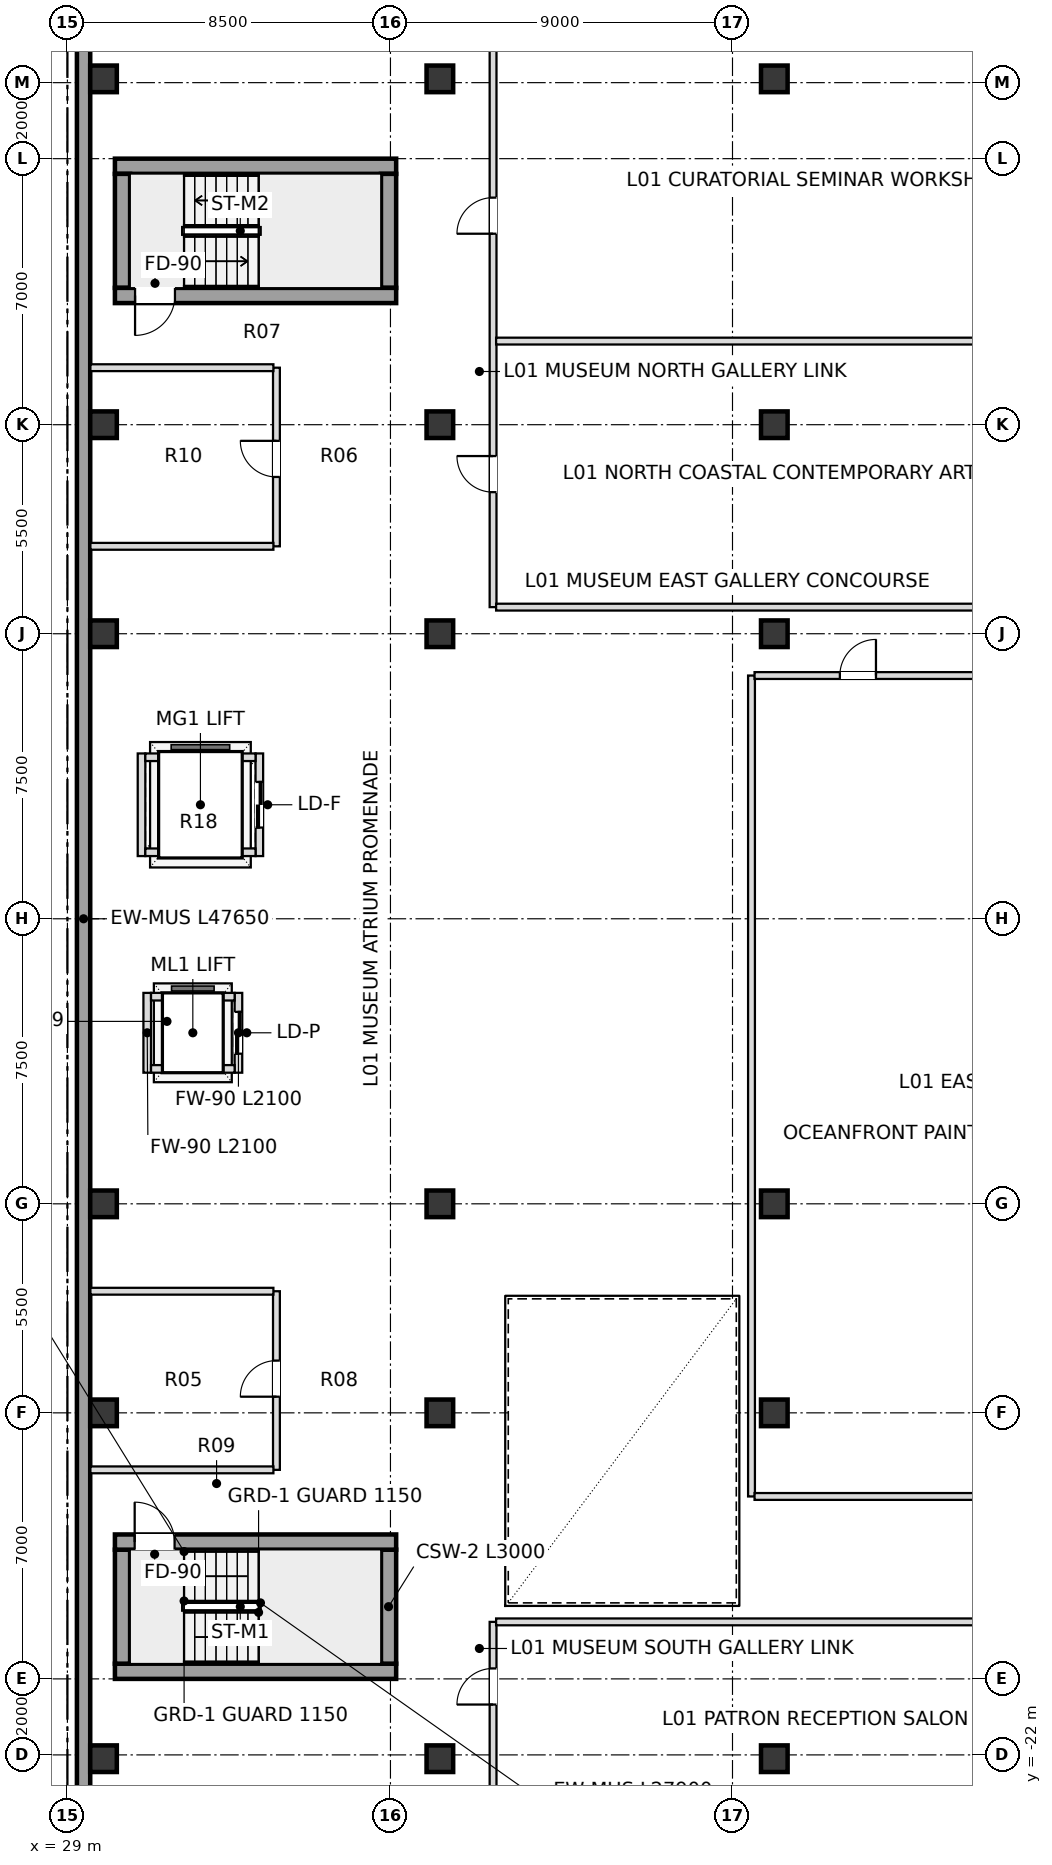
"""IFC4 building model, lengths in metres.
Left out: names, types, materials, properties, quantities, classifications, styles, units other than length and angle.
Written with IfcOpenShell. Run it as: python <this file> out.ifc"""

import sys

from ifc_helpers import new_model, si_unit, direction, frame, frame_2d, origin, origin_2d, place, context, subcontext, project, spatial, rectangle, extrude, element, fill, save


model = new_model("IFC4")
c1 = context("Model", 3, precision=1e-05, world=origin(), true_north=direction((0.0, 1.0)))
c2 = subcontext(c1, "Body", "Model", "MODEL_VIEW")
j1 = project(units=[si_unit("LENGTHUNIT", "METRE"), si_unit("PLANEANGLEUNIT", "RADIAN")], contexts=[c1])
p1 = place(None, origin())
s1 = spatial("IfcSite", under=j1, at=p1, CompositionType="ELEMENT")
p2 = place(p1, origin())
s2 = spatial("IfcBuilding", under=s1, at=p2, CompositionType="ELEMENT")
p3 = place(p2, frame((0.0, 0.0, 6.0)))
s3 = spatial("IfcBuildingStorey", under=s2, at=p3, CompositionType="ELEMENT", Elevation=6.0)
for number, where, z_axis, x_axis in (
    (1, (29.95, -22.1, 0.0), (0.0, 0.0, 1.0), (1.0, 0.0, 0.0)),
    (2, (29.95, -13.0, 0.0), (0.0, 0.0, 1.0), (1.0, 0.0, 0.0)),
    (3, (29.95, -7.5, 0.0), (0.0, 0.0, 1.0), (1.0, 0.0, 0.0)),
    (4, (29.95, 7.5, 0.0), (0.0, 0.0, 1.0), (1.0, 0.0, 0.0)),
    (5, (29.95, 13.0, 0.0), (0.0, 0.0, 1.0), (1.0, 0.0, 0.0)),
    (6, (29.95, 22.1, 0.0), (0.0, 0.0, 1.0), (1.0, 0.0, 0.0)),
    (7, (38.8, -22.1, 0.0), (0.0, 0.0, 1.0), (1.0, 0.0, 0.0)),
    (8, (38.8, -13.0, 0.0), (0.0, 0.0, 1.0), (1.0, 0.0, 0.0)),
    (9, (38.8, -7.5, 0.0), (0.0, 0.0, 1.0), (1.0, 0.0, 0.0)),
    (10, (38.8, 7.5, 0.0), (0.0, 0.0, 1.0), (1.0, 0.0, 0.0)),
    (11, (38.8, 13.0, 0.0), (0.0, 0.0, 1.0), (1.0, 0.0, 0.0)),
    (12, (38.8, 22.1, 0.0), (0.0, 0.0, 1.0), (1.0, 0.0, 0.0)),
    (13, (47.6, -22.1, 0.0), (0.0, 0.0, 1.0), (1.0, 0.0, 0.0)),
    (14, (47.6, -13.0, 0.0), (0.0, 0.0, 1.0), (1.0, 0.0, 0.0)),
    (15, (47.6, -7.5, 0.0), (0.0, 0.0, 1.0), (1.0, 0.0, 0.0)),
    (16, (47.6, 7.5, 0.0), (0.0, 0.0, 1.0), (1.0, 0.0, 0.0)),
    (17, (47.6, 13.0, 0.0), (0.0, 0.0, 1.0), (1.0, 0.0, 0.0)),
    (18, (47.6, 22.1, 0.0), (0.0, 0.0, 1.0), (1.0, 0.0, 0.0)),
):
    element("IfcColumn", number, at=place(p3, frame(where, z_axis=z_axis, x_axis=x_axis)), inside=s3, PredefinedType="COLUMN", context=c2, shape_type="SweptSolid", body=[
        extrude(rectangle(XDim=0.7, YDim=0.7, at=origin_2d()), origin(), (0.0, 0.0, 1.0), 5.4),
    ])
p4 = place(p3, frame((29.425, 23.825, 0.0), z_axis=(0.0, 0.0, 1.0), x_axis=(0.0, -1.0, 0.0)))
e19 = element("IfcWall", 19, at=p4, inside=s3, PredefinedType="SOLIDWALL", context=c2, shape_type="SweptSolid", body=[
    extrude(rectangle(XDim=47.65, YDim=0.35, at=frame_2d((23.825, 0.0))), origin(), (0.0, 0.0, 1.0), 5.08),
])
p5 = place(p3, frame((37.65, -19.8, 0.0), z_axis=(0.0, 0.0, 1.0), x_axis=(-1.0, 0.0, 0.0)))
e20 = element("IfcWall", 20, at=p5, inside=s3, PredefinedType="SHEAR", context=c2, shape_type="SweptSolid", body=[
    extrude(rectangle(XDim=7.4, YDim=0.4, at=frame_2d((3.7, 0.0))), origin(), (0.0, 0.0, 1.0), 5.08),
])
for number, where, z_axis, x_axis in (
    (21, (37.45, -19.6, 0.0), (0.0, 0.0, 1.0), (0.0, 1.0, 0.0)),
    (22, (30.45, -19.6, 0.0), (0.0, 0.0, 1.0), (0.0, 1.0, 0.0)),
):
    element("IfcWall", number, at=place(p3, frame(where, z_axis=z_axis, x_axis=x_axis)), inside=s3, PredefinedType="SHEAR", context=c2, shape_type="SweptSolid", body=[
        extrude(rectangle(XDim=3.0, YDim=0.4, at=frame_2d((1.5, 0.0))), origin(), (0.0, 0.0, 1.0), 5.08),
    ])
p6 = place(p3, frame((30.25, -16.4, 0.0), z_axis=(0.0, 0.0, 1.0), x_axis=(1.0, 0.0, 0.0)))
e23 = element("IfcWall", 23, at=p6, inside=s3, PredefinedType="SHEAR", context=c2, shape_type="SweptSolid", body=[
    extrude(rectangle(XDim=7.4, YDim=0.4, at=frame_2d((3.7, 0.0))), origin(), (0.0, 0.0, 1.0), 5.08),
])
p7 = place(p6, frame((0.52, 0.0, 0.0)))
e24 = element("IfcOpeningElement", 24, at=p7, cuts=e23, PredefinedType="OPENING", context=c2, shape_type="SweptSolid", body=[
    extrude(rectangle(XDim=1.05, YDim=2.15, at=frame_2d((0.525, 1.075))), frame((0.0, 0.21, 0.0), z_axis=(0.0, -1.0, 0.0), x_axis=(1.0, 0.0, 0.0)), (0.0, 0.0, 1.0), 0.42),
])
p8 = place(p3, frame((30.25, 19.8, 0.0), z_axis=(0.0, 0.0, 1.0), x_axis=(1.0, 0.0, 0.0)))
e25 = element("IfcWall", 25, at=p8, inside=s3, PredefinedType="SHEAR", context=c2, shape_type="SweptSolid", body=[
    extrude(rectangle(XDim=7.4, YDim=0.4, at=frame_2d((3.7, 0.0))), origin(), (0.0, 0.0, 1.0), 5.08),
])
for number, where, z_axis, x_axis in (
    (26, (37.45, 16.6, 0.0), (0.0, 0.0, 1.0), (0.0, 1.0, 0.0)),
    (27, (30.45, 16.6, 0.0), (0.0, 0.0, 1.0), (0.0, 1.0, 0.0)),
):
    element("IfcWall", number, at=place(p3, frame(where, z_axis=z_axis, x_axis=x_axis)), inside=s3, PredefinedType="SHEAR", context=c2, shape_type="SweptSolid", body=[
        extrude(rectangle(XDim=3.0, YDim=0.4, at=frame_2d((1.5, 0.0))), origin(), (0.0, 0.0, 1.0), 5.08),
    ])
p9 = place(p3, frame((37.65, 16.4, 0.0), z_axis=(0.0, 0.0, 1.0), x_axis=(-1.0, 0.0, 0.0)))
e28 = element("IfcWall", 28, at=p9, inside=s3, PredefinedType="SHEAR", context=c2, shape_type="SweptSolid", body=[
    extrude(rectangle(XDim=7.4, YDim=0.4, at=frame_2d((3.7, 0.0))), origin(), (0.0, 0.0, 1.0), 5.08),
])
p10 = place(p9, frame((5.82, 0.0, 0.0)))
e29 = element("IfcOpeningElement", 29, at=p10, cuts=e28, PredefinedType="OPENING", context=c2, shape_type="SweptSolid", body=[
    extrude(rectangle(XDim=1.05, YDim=2.15, at=frame_2d((0.525, 1.075))), frame((0.0, 0.21, 0.0), z_axis=(0.0, -1.0, 0.0), x_axis=(1.0, 0.0, 0.0)), (0.0, 0.0, 1.0), 0.42),
])
p11 = place(p3, frame((33.5, -4.05, 0.0), z_axis=(0.0, 0.0, 1.0), x_axis=(0.0, 1.0, 0.0)))
e30 = element("IfcWall", 30, at=p11, inside=s3, PredefinedType="SOLIDWALL", context=c2, shape_type="SweptSolid", body=[
    extrude(rectangle(XDim=2.1, YDim=0.2, at=frame_2d((1.05, 0.0))), origin(), (0.0, 0.0, 1.0), 4.297),
])
p12 = place(p11, frame((0.5, 0.0, 0.0)))
e31 = element("IfcOpeningElement", 31, at=p12, cuts=e30, PredefinedType="OPENING", context=c2, shape_type="SweptSolid", body=[
    extrude(rectangle(XDim=1.1, YDim=2.15, at=frame_2d((0.55, 1.075))), frame((0.0, 0.11, 0.0), z_axis=(0.0, -1.0, 0.0), x_axis=(1.0, 0.0, 0.0)), (0.0, 0.0, 1.0), 0.22),
])
p13 = place(p3, frame((31.1, -4.05, 0.0), z_axis=(0.0, 0.0, 1.0), x_axis=(0.0, 1.0, 0.0)))
e32 = element("IfcWall", 32, at=p13, inside=s3, PredefinedType="SOLIDWALL", context=c2, shape_type="SweptSolid", body=[
    extrude(rectangle(XDim=2.1, YDim=0.2, at=frame_2d((1.05, 0.0))), origin(), (0.0, 0.0, 1.0), 4.297),
])
for number, where, z_axis, x_axis in (
    (33, (31.2, -3.95, 0.0), (0.0, 0.0, 1.0), (1.0, 0.0, 0.0)),
    (34, (31.2, -2.05, 0.0), (0.0, 0.0, 1.0), (1.0, 0.0, 0.0)),
):
    element("IfcWall", number, at=place(p3, frame(where, z_axis=z_axis, x_axis=x_axis)), inside=s3, PredefinedType="SOLIDWALL", context=c2, shape_type="SweptSolid", body=[
        extrude(rectangle(XDim=2.2, YDim=0.2, at=frame_2d((1.1, 0.0))), origin(), (0.0, 0.0, 1.0), 4.297),
    ])
p14 = place(p3, frame((34.05, 1.65, 0.0), z_axis=(0.0, 0.0, 1.0), x_axis=(0.0, 1.0, 0.0)))
e35 = element("IfcWall", 35, at=p14, inside=s3, PredefinedType="SOLIDWALL", context=c2, shape_type="SweptSolid", body=[
    extrude(rectangle(XDim=2.7, YDim=0.2, at=frame_2d((1.35, 0.0))), origin(), (0.0, 0.0, 1.0), 4.297),
])
p15 = place(p14, frame((0.75, 0.0, 0.0)))
e36 = element("IfcOpeningElement", 36, at=p15, cuts=e35, PredefinedType="OPENING", context=c2, shape_type="SweptSolid", body=[
    extrude(rectangle(XDim=1.2, YDim=2.2, at=frame_2d((0.6, 1.1))), frame((0.0, 0.11, 0.0), z_axis=(0.0, -1.0, 0.0), x_axis=(1.0, 0.0, 0.0)), (0.0, 0.0, 1.0), 0.22),
])
p16 = place(p3, frame((30.95, 1.65, 0.0), z_axis=(0.0, 0.0, 1.0), x_axis=(0.0, 1.0, 0.0)))
e37 = element("IfcWall", 37, at=p16, inside=s3, PredefinedType="SOLIDWALL", context=c2, shape_type="SweptSolid", body=[
    extrude(rectangle(XDim=2.7, YDim=0.2, at=frame_2d((1.35, 0.0))), origin(), (0.0, 0.0, 1.0), 4.297),
])
for number, where, z_axis, x_axis in (
    (38, (31.05, 1.75, 0.0), (0.0, 0.0, 1.0), (1.0, 0.0, 0.0)),
    (39, (31.05, 4.25, 0.0), (0.0, 0.0, 1.0), (1.0, 0.0, 0.0)),
):
    element("IfcWall", number, at=place(p3, frame(where, z_axis=z_axis, x_axis=x_axis)), inside=s3, PredefinedType="SOLIDWALL", context=c2, shape_type="SweptSolid", body=[
        extrude(rectangle(XDim=2.9, YDim=0.2, at=frame_2d((1.45, 0.0))), origin(), (0.0, 0.0, 1.0), 4.297),
    ])
p17 = place(p3, frame((34.5, -14.5, 0.0), z_axis=(0.0, 0.0, 1.0), x_axis=(0.0, 1.0, 0.0)))
e40 = element("IfcWall", 40, at=p17, inside=s3, PredefinedType="PARTITIONING", context=c2, shape_type="SweptSolid", body=[
    extrude(rectangle(XDim=4.7, YDim=0.18, at=frame_2d((2.35, 0.0))), origin(), (0.0, 0.0, 1.0), 4.297),
])
p18 = place(p17, frame((1.925, 0.0, 0.0)))
e41 = element("IfcOpeningElement", 41, at=p18, cuts=e40, PredefinedType="OPENING", context=c2, shape_type="SweptSolid", body=[
    extrude(rectangle(XDim=0.95, YDim=2.15, at=frame_2d((0.475, 1.075))), frame((0.0, 0.1, 0.0), z_axis=(0.0, -1.0, 0.0), x_axis=(1.0, 0.0, 0.0)), (0.0, 0.0, 1.0), 0.2),
])
p19 = place(p3, frame((34.5, 9.8, 0.0), z_axis=(0.0, 0.0, 1.0), x_axis=(0.0, 1.0, 0.0)))
e42 = element("IfcWall", 42, at=p19, inside=s3, PredefinedType="PARTITIONING", context=c2, shape_type="SweptSolid", body=[
    extrude(rectangle(XDim=4.7, YDim=0.18, at=frame_2d((2.35, 0.0))), origin(), (0.0, 0.0, 1.0), 4.297),
])
p20 = place(p19, frame((1.825, 0.0, 0.0)))
e43 = element("IfcOpeningElement", 43, at=p20, cuts=e42, PredefinedType="OPENING", context=c2, shape_type="SweptSolid", body=[
    extrude(rectangle(XDim=0.95, YDim=2.15, at=frame_2d((0.475, 1.075))), frame((0.0, 0.1, 0.0), z_axis=(0.0, -1.0, 0.0), x_axis=(1.0, 0.0, 0.0)), (0.0, 0.0, 1.0), 0.2),
])
p21 = place(p3, frame((40.2, -23.645, 0.0), z_axis=(0.0, 0.0, 1.0), x_axis=(0.0, 1.0, 0.0)))
e44 = element("IfcWall", 44, at=p21, inside=s3, PredefinedType="PARTITIONING", context=c2, shape_type="SweptSolid", body=[
    extrude(rectangle(XDim=5.145, YDim=0.18, at=frame_2d((2.573, 0.0))), origin(), (0.0, 0.0, 1.0), 4.297),
])
p22 = place(p21, frame((2.97, 0.0, 0.0)))
e45 = element("IfcOpeningElement", 45, at=p22, cuts=e44, PredefinedType="OPENING", context=c2, shape_type="SweptSolid", body=[
    extrude(rectangle(XDim=0.95, YDim=2.15, at=frame_2d((0.475, 1.075))), frame((0.0, 0.1, 0.0), z_axis=(0.0, -1.0, 0.0), x_axis=(1.0, 0.0, 0.0)), (0.0, 0.0, 1.0), 0.2),
])
p23 = place(p3, frame((40.2, 8.2, 0.0), z_axis=(0.0, 0.0, 1.0), x_axis=(0.0, 1.0, 0.0)))
e46 = element("IfcWall", 46, at=p23, inside=s3, PredefinedType="PARTITIONING", context=c2, shape_type="SweptSolid", body=[
    extrude(rectangle(XDim=15.52, YDim=0.18, at=frame_2d((7.76, 0.0))), origin(), (0.0, 0.0, 1.0), 4.297),
])
p24 = place(p23, frame((3.025, 0.0, 0.0)))
e47 = element("IfcOpeningElement", 47, at=p24, cuts=e46, PredefinedType="OPENING", context=c2, shape_type="SweptSolid", body=[
    extrude(rectangle(XDim=0.95, YDim=2.15, at=frame_2d((0.475, 1.075))), frame((0.0, 0.1, 0.0), z_axis=(0.0, -1.0, 0.0), x_axis=(1.0, 0.0, 0.0)), (0.0, 0.0, 1.0), 0.2),
])
p25 = place(p23, frame((9.825, 0.0, 0.0)))
e48 = element("IfcOpeningElement", 48, at=p25, cuts=e46, PredefinedType="OPENING", context=c2, shape_type="SweptSolid", body=[
    extrude(rectangle(XDim=0.95, YDim=2.15, at=frame_2d((0.475, 1.075))), frame((0.0, 0.1, 0.0), z_axis=(0.0, -1.0, 0.0), x_axis=(1.0, 0.0, 0.0)), (0.0, 0.0, 1.0), 0.2),
])
p26 = place(p3, frame((47.0, -15.2, 0.0), z_axis=(0.0, 0.0, 1.0), x_axis=(0.0, 1.0, 0.0)))
e49 = element("IfcWall", 49, at=p26, inside=s3, PredefinedType="PARTITIONING", context=c2, shape_type="SweptSolid", body=[
    extrude(rectangle(XDim=21.6, YDim=0.18, at=frame_2d((10.8, 0.0))), origin(), (0.0, 0.0, 1.0), 4.297),
])
p27 = place(p3, frame((40.28, -18.5, 0.0), z_axis=(0.0, 0.0, 1.0), x_axis=(1.0, 0.0, 0.0)))
e50 = element("IfcWall", 50, at=p27, inside=s3, PredefinedType="PARTITIONING", context=c2, shape_type="SweptSolid", body=[
    extrude(rectangle(XDim=16.865, YDim=0.18, at=frame_2d((8.433, 0.0))), origin(), (0.0, 0.0, 1.0), 4.214),
])
p28 = place(p3, frame((47.08, -15.2, 0.0), z_axis=(0.0, 0.0, 1.0), x_axis=(1.0, 0.0, 0.0)))
e51 = element("IfcWall", 51, at=p28, inside=s3, PredefinedType="PARTITIONING", context=c2, shape_type="SweptSolid", body=[
    extrude(rectangle(XDim=10.065, YDim=0.18, at=frame_2d((5.032, 0.0))), origin(), (0.0, 0.0, 1.0), 4.214),
])
p29 = place(p3, frame((29.605, -14.5, 0.0), z_axis=(0.0, 0.0, 1.0), x_axis=(1.0, 0.0, 0.0)))
e52 = element("IfcWall", 52, at=p29, inside=s3, PredefinedType="PARTITIONING", context=c2, shape_type="SweptSolid", body=[
    extrude(rectangle(XDim=4.815, YDim=0.18, at=frame_2d((2.407, 0.0))), origin(), (0.0, 0.0, 1.0), 4.214),
])
p30 = place(p3, frame((29.605, -9.8, 0.0), z_axis=(0.0, 0.0, 1.0), x_axis=(1.0, 0.0, 0.0)))
e53 = element("IfcWall", 53, at=p30, inside=s3, PredefinedType="PARTITIONING", context=c2, shape_type="SweptSolid", body=[
    extrude(rectangle(XDim=4.815, YDim=0.18, at=frame_2d((2.407, 0.0))), origin(), (0.0, 0.0, 1.0), 4.297),
])
p31 = place(p3, frame((47.08, 6.4, 0.0), z_axis=(0.0, 0.0, 1.0), x_axis=(1.0, 0.0, 0.0)))
e54 = element("IfcWall", 54, at=p31, inside=s3, PredefinedType="PARTITIONING", context=c2, shape_type="SweptSolid", body=[
    extrude(rectangle(XDim=10.065, YDim=0.18, at=frame_2d((5.032, 0.0))), origin(), (0.0, 0.0, 1.0), 4.297),
])
p32 = place(p31, frame((2.245, 0.0, 0.0)))
e55 = element("IfcOpeningElement", 55, at=p32, cuts=e54, PredefinedType="OPENING", context=c2, shape_type="SweptSolid", body=[
    extrude(rectangle(XDim=0.95, YDim=2.15, at=frame_2d((0.475, 1.075))), frame((0.0, 0.1, 0.0), z_axis=(0.0, -1.0, 0.0), x_axis=(1.0, 0.0, 0.0)), (0.0, 0.0, 1.0), 0.2),
])
p33 = place(p3, frame((40.28, 8.2, 0.0), z_axis=(0.0, 0.0, 1.0), x_axis=(1.0, 0.0, 0.0)))
e56 = element("IfcWall", 56, at=p33, inside=s3, PredefinedType="PARTITIONING", context=c2, shape_type="SweptSolid", body=[
    extrude(rectangle(XDim=16.865, YDim=0.18, at=frame_2d((8.433, 0.0))), origin(), (0.0, 0.0, 1.0), 4.297),
])
for number, where, z_axis, x_axis in (
    (57, (29.605, 9.8, 0.0), (0.0, 0.0, 1.0), (1.0, 0.0, 0.0)),
    (58, (29.605, 14.5, 0.0), (0.0, 0.0, 1.0), (1.0, 0.0, 0.0)),
):
    element("IfcWall", number, at=place(p3, frame(where, z_axis=z_axis, x_axis=x_axis)), inside=s3, PredefinedType="PARTITIONING", context=c2, shape_type="SweptSolid", body=[
        extrude(rectangle(XDim=4.815, YDim=0.18, at=frame_2d((2.407, 0.0))), origin(), (0.0, 0.0, 1.0), 4.297),
    ])
p34 = place(p3, frame((40.28, 15.2, 0.0), z_axis=(0.0, 0.0, 1.0), x_axis=(1.0, 0.0, 0.0)))
e59 = element("IfcWall", 59, at=p34, inside=s3, PredefinedType="PARTITIONING", context=c2, shape_type="SweptSolid", body=[
    extrude(rectangle(XDim=16.865, YDim=0.18, at=frame_2d((8.433, 0.0))), origin(), (0.0, 0.0, 1.0), 4.297),
])
p35 = place(p7, origin())
e60 = element("IfcDoor", 60, at=p35, inside=s3, OperationType="SINGLE_SWING_LEFT", PredefinedType="DOOR", context=c2, shape_type="SweptSolid", body=[
    extrude(rectangle(XDim=1.05, YDim=2.15, at=frame_2d((0.525, 1.075))), frame((0.0, 0.025, 0.0), z_axis=(0.0, -1.0, 0.0), x_axis=(1.0, 0.0, 0.0)), (0.0, 0.0, 1.0), 0.05),
])
fill(e24, e60)
p36 = place(p10, origin())
e61 = element("IfcDoor", 61, at=p36, inside=s3, OperationType="SINGLE_SWING_RIGHT", PredefinedType="DOOR", context=c2, shape_type="SweptSolid", body=[
    extrude(rectangle(XDim=1.05, YDim=2.15, at=frame_2d((0.525, 1.075))), frame((0.0, 0.025, 0.0), z_axis=(0.0, -1.0, 0.0), x_axis=(1.0, 0.0, 0.0)), (0.0, 0.0, 1.0), 0.05),
])
fill(e29, e61)
p37 = place(p12, origin())
e62 = element("IfcDoor", 62, at=p37, inside=s3, OperationType="DOUBLE_DOOR_SLIDING", PredefinedType="DOOR", context=c2, shape_type="SweptSolid", body=[
    extrude(rectangle(XDim=1.1, YDim=2.15, at=frame_2d((0.55, 1.075))), frame((0.0, 0.025, 0.0), z_axis=(0.0, -1.0, 0.0), x_axis=(1.0, 0.0, 0.0)), (0.0, 0.0, 1.0), 0.05),
])
fill(e31, e62)
p38 = place(p15, origin())
e63 = element("IfcDoor", 63, at=p38, inside=s3, OperationType="DOUBLE_DOOR_SLIDING", PredefinedType="DOOR", context=c2, shape_type="SweptSolid", body=[
    extrude(rectangle(XDim=1.2, YDim=2.2, at=frame_2d((0.6, 1.1))), frame((0.0, 0.025, 0.0), z_axis=(0.0, -1.0, 0.0), x_axis=(1.0, 0.0, 0.0)), (0.0, 0.0, 1.0), 0.05),
])
fill(e36, e63)
p39 = place(p24, origin())
e64 = element("IfcDoor", 64, at=p39, inside=s3, OperationType="SINGLE_SWING_RIGHT", PredefinedType="DOOR", context=c2, shape_type="SweptSolid", body=[
    extrude(rectangle(XDim=0.95, YDim=2.15, at=frame_2d((0.475, 1.075))), frame((0.0, 0.025, 0.0), z_axis=(0.0, -1.0, 0.0), x_axis=(1.0, 0.0, 0.0)), (0.0, 0.0, 1.0), 0.05),
])
fill(e47, e64)
p40 = place(p25, origin())
e65 = element("IfcDoor", 65, at=p40, inside=s3, OperationType="SINGLE_SWING_LEFT", PredefinedType="DOOR", context=c2, shape_type="SweptSolid", body=[
    extrude(rectangle(XDim=0.95, YDim=2.15, at=frame_2d((0.475, 1.075))), frame((0.0, 0.025, 0.0), z_axis=(0.0, -1.0, 0.0), x_axis=(1.0, 0.0, 0.0)), (0.0, 0.0, 1.0), 0.05),
])
fill(e48, e65)
p41 = place(p20, origin())
e66 = element("IfcDoor", 66, at=p41, inside=s3, OperationType="SINGLE_SWING_RIGHT", PredefinedType="DOOR", context=c2, shape_type="SweptSolid", body=[
    extrude(rectangle(XDim=0.95, YDim=2.15, at=frame_2d((0.475, 1.075))), frame((0.0, 0.025, 0.0), z_axis=(0.0, -1.0, 0.0), x_axis=(1.0, 0.0, 0.0)), (0.0, 0.0, 1.0), 0.05),
])
fill(e43, e66)
p42 = place(p18, origin())
e67 = element("IfcDoor", 67, at=p42, inside=s3, OperationType="SINGLE_SWING_LEFT", PredefinedType="DOOR", context=c2, shape_type="SweptSolid", body=[
    extrude(rectangle(XDim=0.95, YDim=2.15, at=frame_2d((0.475, 1.075))), frame((0.0, 0.025, 0.0), z_axis=(0.0, -1.0, 0.0), x_axis=(1.0, 0.0, 0.0)), (0.0, 0.0, 1.0), 0.05),
])
fill(e41, e67)
p43 = place(p32, origin())
e68 = element("IfcDoor", 68, at=p43, inside=s3, OperationType="SINGLE_SWING_RIGHT", PredefinedType="DOOR", context=c2, shape_type="SweptSolid", body=[
    extrude(rectangle(XDim=0.95, YDim=2.15, at=frame_2d((0.475, 1.075))), frame((0.0, 0.025, 0.0), z_axis=(0.0, -1.0, 0.0), x_axis=(1.0, 0.0, 0.0)), (0.0, 0.0, 1.0), 0.05),
])
fill(e55, e68)
p44 = place(p22, origin())
e69 = element("IfcDoor", 69, at=p44, inside=s3, OperationType="SINGLE_SWING_LEFT", PredefinedType="DOOR", context=c2, shape_type="SweptSolid", body=[
    extrude(rectangle(XDim=0.95, YDim=2.15, at=frame_2d((0.475, 1.075))), frame((0.0, 0.025, 0.0), z_axis=(0.0, -1.0, 0.0), x_axis=(1.0, 0.0, 0.0)), (0.0, 0.0, 1.0), 0.05),
])
fill(e45, e69)
save(model, sys.argv[1])
